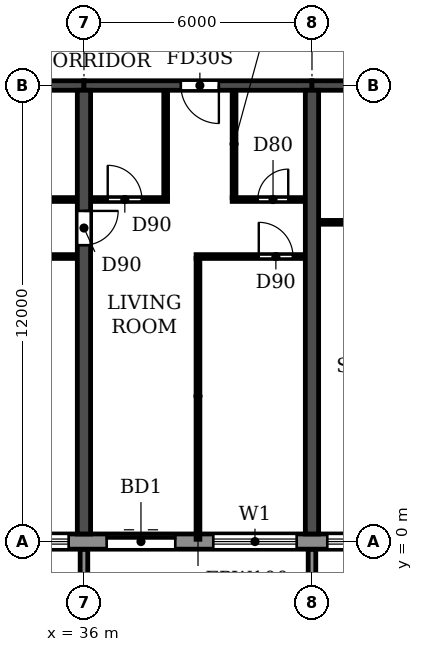
"""IFC4 building model, lengths in metres.
Left out: names, types, materials, properties, quantities, classifications, styles, units other than length and angle.
Written with IfcOpenShell. Run it as: python <this file> out.ifc"""

import sys

from ifc_helpers import new_model, si_unit, direction, frame, frame_2d, origin, place, context, subcontext, project, spatial, polyline, rectangle, outline, extrude, source, transform, mapped, element, fill, save


model = new_model("IFC4")
c1 = context("Model", 3, precision=1e-05, world=origin(), true_north=direction((0.0, 1.0)))
c2 = subcontext(c1, "Body", "Model", "MODEL_VIEW")
j1 = project(units=[si_unit("LENGTHUNIT", "METRE"), si_unit("PLANEANGLEUNIT", "RADIAN")], contexts=[c1])
p1 = place(None, origin())
s1 = spatial("IfcSite", under=j1, at=p1, CompositionType="ELEMENT")
p2 = place(p1, origin())
s2 = spatial("IfcBuilding", under=s1, at=p2, CompositionType="ELEMENT")
p3 = place(p2, frame((0.0, 0.0, 82.8)))
s3 = spatial("IfcBuildingStorey", under=s2, at=p3, CompositionType="ELEMENT", Elevation=82.8)
p4 = place(p3, frame((36.0, 0.2, 0.0), z_axis=(0.0, 0.0, 1.0), x_axis=(0.0, 1.0, 0.0)))
e1 = element("IfcWall", 1, at=p4, inside=s3, PredefinedType="SHEAR", context=c2, shape_type="SweptSolid", body=[
    extrude(rectangle(XDim=11.675, YDim=0.35, at=frame_2d((5.837, 0.0))), origin(), (0.0, 0.0, 1.0), 3.06),
])
p5 = place(p4, frame((7.6, 0.0, 0.0)))
e2 = element("IfcOpeningElement", 2, at=p5, cuts=e1, PredefinedType="OPENING", context=c2, shape_type="SweptSolid", body=[
    extrude(rectangle(XDim=0.9, YDim=2.1, at=frame_2d((0.45, 1.05))), frame((0.0, 0.185, 0.0), z_axis=(0.0, -1.0, 0.0), x_axis=(1.0, 0.0, 0.0)), (0.0, 0.0, 1.0), 0.37),
])
p6 = place(p3, frame((42.0, 0.2, 0.0), z_axis=(0.0, 0.0, 1.0), x_axis=(0.0, 1.0, 0.0)))
e3 = element("IfcWall", 3, at=p6, inside=s3, PredefinedType="SHEAR", context=c2, shape_type="SweptSolid", body=[
    extrude(rectangle(XDim=11.675, YDim=0.35, at=frame_2d((5.837, 0.0))), origin(), (0.0, 0.0, 1.0), 3.06),
])
p7 = place(p3, frame((30.0, 12.0, 0.0), z_axis=(0.0, 0.0, 1.0), x_axis=(1.0, 0.0, 0.0)))
e4 = element("IfcWall", 4, at=p7, inside=s3, PredefinedType="SHEAR", context=c2, shape_type="SweptSolid", body=[
    extrude(rectangle(XDim=6.0, YDim=0.25, at=frame_2d((3.0, 0.0))), origin(), (0.0, 0.0, 1.0), 2.46),
])
p8 = place(p3, frame((36.0, 12.0, 0.0), z_axis=(0.0, 0.0, 1.0), x_axis=(1.0, 0.0, 0.0)))
e5 = element("IfcWall", 5, at=p8, inside=s3, PredefinedType="SHEAR", context=c2, shape_type="SweptSolid", body=[
    extrude(rectangle(XDim=6.0, YDim=0.25, at=frame_2d((3.0, 0.0))), origin(), (0.0, 0.0, 1.0), 2.46),
])
p9 = place(p8, frame((2.55, 0.0, 0.0)))
e6 = element("IfcOpeningElement", 6, at=p9, cuts=e5, PredefinedType="OPENING", context=c2, shape_type="SweptSolid", body=[
    extrude(rectangle(XDim=1.0, YDim=2.1, at=frame_2d((0.5, 1.05))), frame((0.0, 0.135, 0.0), z_axis=(0.0, -1.0, 0.0), x_axis=(1.0, 0.0, 0.0)), (0.0, 0.0, 1.0), 0.27),
])
p10 = place(p3, frame((42.0, 12.0, 0.0), z_axis=(0.0, 0.0, 1.0), x_axis=(1.0, 0.0, 0.0)))
e7 = element("IfcWall", 7, at=p10, inside=s3, PredefinedType="SHEAR", context=c2, shape_type="SweptSolid", body=[
    extrude(rectangle(XDim=6.0, YDim=0.25, at=frame_2d((3.0, 0.0))), origin(), (0.0, 0.0, 1.0), 2.46),
])
p11 = place(p10, frame((2.45, 0.0, 0.0)))
e8 = element("IfcOpeningElement", 8, at=p11, cuts=e7, PredefinedType="OPENING", context=c2, shape_type="SweptSolid", body=[
    extrude(rectangle(XDim=1.0, YDim=2.1, at=frame_2d((0.5, 1.05))), frame((0.0, 0.135, 0.0), z_axis=(0.0, -1.0, 0.0), x_axis=(1.0, 0.0, 0.0)), (0.0, 0.0, 1.0), 0.27),
])
p12 = place(p3, frame((10.683, 0.0, 0.0), z_axis=(0.0, 0.0, 1.0), x_axis=(1.0, 0.0, 0.0)))
e9 = element("IfcWall", 9, at=p12, inside=s3, PredefinedType="STANDARD", context=c2, shape_type="SweptSolid", body=[
    extrude(rectangle(XDim=80.634, YDim=0.4, at=frame_2d((40.317, 0.0))), origin(), (0.0, 0.0, 1.0), 3.06),
])
p13 = place(p12, frame((1.717, 0.0, 0.9)))
e10 = element("IfcOpeningElement", 10, at=p13, cuts=e9, PredefinedType="OPENING", context=c2, shape_type="SweptSolid", body=[
    extrude(rectangle(XDim=2.2, YDim=1.5, at=frame_2d((1.1, 0.75))), frame((0.0, 0.21, 0.0), z_axis=(0.0, -1.0, 0.0), x_axis=(1.0, 0.0, 0.0)), (0.0, 0.0, 1.0), 0.42),
])
p14 = place(p12, frame((4.917, 0.0, 0.0)))
e11 = element("IfcOpeningElement", 11, at=p14, cuts=e9, PredefinedType="OPENING", context=c2, shape_type="SweptSolid", body=[
    extrude(rectangle(XDim=1.8, YDim=2.4, at=frame_2d((0.9, 1.2))), frame((0.0, 0.21, 0.0), z_axis=(0.0, -1.0, 0.0), x_axis=(1.0, 0.0, 0.0)), (0.0, 0.0, 1.0), 0.42),
])
p15 = place(p12, frame((7.717, 0.0, 0.9)))
e12 = element("IfcOpeningElement", 12, at=p15, cuts=e9, PredefinedType="OPENING", context=c2, shape_type="SweptSolid", body=[
    extrude(rectangle(XDim=2.2, YDim=1.5, at=frame_2d((1.1, 0.75))), frame((0.0, 0.21, 0.0), z_axis=(0.0, -1.0, 0.0), x_axis=(1.0, 0.0, 0.0)), (0.0, 0.0, 1.0), 0.42),
])
p16 = place(p12, frame((10.717, 0.0, 0.9)))
e13 = element("IfcOpeningElement", 13, at=p16, cuts=e9, PredefinedType="OPENING", context=c2, shape_type="SweptSolid", body=[
    extrude(rectangle(XDim=2.2, YDim=1.5, at=frame_2d((1.1, 0.75))), frame((0.0, 0.21, 0.0), z_axis=(0.0, -1.0, 0.0), x_axis=(1.0, 0.0, 0.0)), (0.0, 0.0, 1.0), 0.42),
])
p17 = place(p12, frame((13.917, 0.0, 0.0)))
e14 = element("IfcOpeningElement", 14, at=p17, cuts=e9, PredefinedType="OPENING", context=c2, shape_type="SweptSolid", body=[
    extrude(rectangle(XDim=1.8, YDim=2.4, at=frame_2d((0.9, 1.2))), frame((0.0, 0.21, 0.0), z_axis=(0.0, -1.0, 0.0), x_axis=(1.0, 0.0, 0.0)), (0.0, 0.0, 1.0), 0.42),
])
p18 = place(p12, frame((16.717, 0.0, 0.9)))
e15 = element("IfcOpeningElement", 15, at=p18, cuts=e9, PredefinedType="OPENING", context=c2, shape_type="SweptSolid", body=[
    extrude(rectangle(XDim=2.2, YDim=1.5, at=frame_2d((1.1, 0.75))), frame((0.0, 0.21, 0.0), z_axis=(0.0, -1.0, 0.0), x_axis=(1.0, 0.0, 0.0)), (0.0, 0.0, 1.0), 0.42),
])
p19 = place(p12, frame((19.717, 0.0, 0.9)))
e16 = element("IfcOpeningElement", 16, at=p19, cuts=e9, PredefinedType="OPENING", context=c2, shape_type="SweptSolid", body=[
    extrude(rectangle(XDim=2.2, YDim=1.5, at=frame_2d((1.1, 0.75))), frame((0.0, 0.21, 0.0), z_axis=(0.0, -1.0, 0.0), x_axis=(1.0, 0.0, 0.0)), (0.0, 0.0, 1.0), 0.42),
])
p20 = place(p12, frame((22.717, 0.0, 0.9)))
e17 = element("IfcOpeningElement", 17, at=p20, cuts=e9, PredefinedType="OPENING", context=c2, shape_type="SweptSolid", body=[
    extrude(rectangle(XDim=2.2, YDim=1.5, at=frame_2d((1.1, 0.75))), frame((0.0, 0.21, 0.0), z_axis=(0.0, -1.0, 0.0), x_axis=(1.0, 0.0, 0.0)), (0.0, 0.0, 1.0), 0.42),
])
p21 = place(p12, frame((25.917, 0.0, 0.0)))
e18 = element("IfcOpeningElement", 18, at=p21, cuts=e9, PredefinedType="OPENING", context=c2, shape_type="SweptSolid", body=[
    extrude(rectangle(XDim=1.8, YDim=2.4, at=frame_2d((0.9, 1.2))), frame((0.0, 0.21, 0.0), z_axis=(0.0, -1.0, 0.0), x_axis=(1.0, 0.0, 0.0)), (0.0, 0.0, 1.0), 0.42),
])
p22 = place(p12, frame((28.717, 0.0, 0.9)))
e19 = element("IfcOpeningElement", 19, at=p22, cuts=e9, PredefinedType="OPENING", context=c2, shape_type="SweptSolid", body=[
    extrude(rectangle(XDim=2.2, YDim=1.5, at=frame_2d((1.1, 0.75))), frame((0.0, 0.21, 0.0), z_axis=(0.0, -1.0, 0.0), x_axis=(1.0, 0.0, 0.0)), (0.0, 0.0, 1.0), 0.42),
])
p23 = place(p12, frame((31.717, 0.0, 0.9)))
e20 = element("IfcOpeningElement", 20, at=p23, cuts=e9, PredefinedType="OPENING", context=c2, shape_type="SweptSolid", body=[
    extrude(rectangle(XDim=2.2, YDim=1.5, at=frame_2d((1.1, 0.75))), frame((0.0, 0.21, 0.0), z_axis=(0.0, -1.0, 0.0), x_axis=(1.0, 0.0, 0.0)), (0.0, 0.0, 1.0), 0.42),
])
p24 = place(p12, frame((34.717, 0.0, 0.9)))
e21 = element("IfcOpeningElement", 21, at=p24, cuts=e9, PredefinedType="OPENING", context=c2, shape_type="SweptSolid", body=[
    extrude(rectangle(XDim=2.2, YDim=1.5, at=frame_2d((1.1, 0.75))), frame((0.0, 0.21, 0.0), z_axis=(0.0, -1.0, 0.0), x_axis=(1.0, 0.0, 0.0)), (0.0, 0.0, 1.0), 0.42),
])
p25 = place(p12, frame((37.717, 0.0, 0.9)))
e22 = element("IfcOpeningElement", 22, at=p25, cuts=e9, PredefinedType="OPENING", context=c2, shape_type="SweptSolid", body=[
    extrude(rectangle(XDim=2.2, YDim=1.5, at=frame_2d((1.1, 0.75))), frame((0.0, 0.21, 0.0), z_axis=(0.0, -1.0, 0.0), x_axis=(1.0, 0.0, 0.0)), (0.0, 0.0, 1.0), 0.42),
])
p26 = place(p12, frame((40.917, 0.0, 0.0)))
e23 = element("IfcOpeningElement", 23, at=p26, cuts=e9, PredefinedType="OPENING", context=c2, shape_type="SweptSolid", body=[
    extrude(rectangle(XDim=1.8, YDim=2.4, at=frame_2d((0.9, 1.2))), frame((0.0, 0.21, 0.0), z_axis=(0.0, -1.0, 0.0), x_axis=(1.0, 0.0, 0.0)), (0.0, 0.0, 1.0), 0.42),
])
p27 = place(p12, frame((43.717, 0.0, 0.9)))
e24 = element("IfcOpeningElement", 24, at=p27, cuts=e9, PredefinedType="OPENING", context=c2, shape_type="SweptSolid", body=[
    extrude(rectangle(XDim=2.2, YDim=1.5, at=frame_2d((1.1, 0.75))), frame((0.0, 0.21, 0.0), z_axis=(0.0, -1.0, 0.0), x_axis=(1.0, 0.0, 0.0)), (0.0, 0.0, 1.0), 0.42),
])
p28 = place(p12, frame((46.717, 0.0, 0.9)))
e25 = element("IfcOpeningElement", 25, at=p28, cuts=e9, PredefinedType="OPENING", context=c2, shape_type="SweptSolid", body=[
    extrude(rectangle(XDim=2.2, YDim=1.5, at=frame_2d((1.1, 0.75))), frame((0.0, 0.21, 0.0), z_axis=(0.0, -1.0, 0.0), x_axis=(1.0, 0.0, 0.0)), (0.0, 0.0, 1.0), 0.42),
])
p29 = place(p12, frame((49.717, 0.0, 0.9)))
e26 = element("IfcOpeningElement", 26, at=p29, cuts=e9, PredefinedType="OPENING", context=c2, shape_type="SweptSolid", body=[
    extrude(rectangle(XDim=2.2, YDim=1.5, at=frame_2d((1.1, 0.75))), frame((0.0, 0.21, 0.0), z_axis=(0.0, -1.0, 0.0), x_axis=(1.0, 0.0, 0.0)), (0.0, 0.0, 1.0), 0.42),
])
p30 = place(p12, frame((52.917, 0.0, 0.0)))
e27 = element("IfcOpeningElement", 27, at=p30, cuts=e9, PredefinedType="OPENING", context=c2, shape_type="SweptSolid", body=[
    extrude(rectangle(XDim=1.8, YDim=2.4, at=frame_2d((0.9, 1.2))), frame((0.0, 0.21, 0.0), z_axis=(0.0, -1.0, 0.0), x_axis=(1.0, 0.0, 0.0)), (0.0, 0.0, 1.0), 0.42),
])
p31 = place(p12, frame((55.717, 0.0, 0.9)))
e28 = element("IfcOpeningElement", 28, at=p31, cuts=e9, PredefinedType="OPENING", context=c2, shape_type="SweptSolid", body=[
    extrude(rectangle(XDim=2.2, YDim=1.5, at=frame_2d((1.1, 0.75))), frame((0.0, 0.21, 0.0), z_axis=(0.0, -1.0, 0.0), x_axis=(1.0, 0.0, 0.0)), (0.0, 0.0, 1.0), 0.42),
])
p32 = place(p12, frame((58.717, 0.0, 0.9)))
e29 = element("IfcOpeningElement", 29, at=p32, cuts=e9, PredefinedType="OPENING", context=c2, shape_type="SweptSolid", body=[
    extrude(rectangle(XDim=2.2, YDim=1.5, at=frame_2d((1.1, 0.75))), frame((0.0, 0.21, 0.0), z_axis=(0.0, -1.0, 0.0), x_axis=(1.0, 0.0, 0.0)), (0.0, 0.0, 1.0), 0.42),
])
p33 = place(p12, frame((61.717, 0.0, 0.9)))
e30 = element("IfcOpeningElement", 30, at=p33, cuts=e9, PredefinedType="OPENING", context=c2, shape_type="SweptSolid", body=[
    extrude(rectangle(XDim=2.2, YDim=1.5, at=frame_2d((1.1, 0.75))), frame((0.0, 0.21, 0.0), z_axis=(0.0, -1.0, 0.0), x_axis=(1.0, 0.0, 0.0)), (0.0, 0.0, 1.0), 0.42),
])
p34 = place(p12, frame((64.917, 0.0, 0.0)))
e31 = element("IfcOpeningElement", 31, at=p34, cuts=e9, PredefinedType="OPENING", context=c2, shape_type="SweptSolid", body=[
    extrude(rectangle(XDim=1.8, YDim=2.4, at=frame_2d((0.9, 1.2))), frame((0.0, 0.21, 0.0), z_axis=(0.0, -1.0, 0.0), x_axis=(1.0, 0.0, 0.0)), (0.0, 0.0, 1.0), 0.42),
])
p35 = place(p12, frame((67.717, 0.0, 0.9)))
e32 = element("IfcOpeningElement", 32, at=p35, cuts=e9, PredefinedType="OPENING", context=c2, shape_type="SweptSolid", body=[
    extrude(rectangle(XDim=2.2, YDim=1.5, at=frame_2d((1.1, 0.75))), frame((0.0, 0.21, 0.0), z_axis=(0.0, -1.0, 0.0), x_axis=(1.0, 0.0, 0.0)), (0.0, 0.0, 1.0), 0.42),
])
p36 = place(p12, frame((70.717, 0.0, 0.9)))
e33 = element("IfcOpeningElement", 33, at=p36, cuts=e9, PredefinedType="OPENING", context=c2, shape_type="SweptSolid", body=[
    extrude(rectangle(XDim=2.2, YDim=1.5, at=frame_2d((1.1, 0.75))), frame((0.0, 0.21, 0.0), z_axis=(0.0, -1.0, 0.0), x_axis=(1.0, 0.0, 0.0)), (0.0, 0.0, 1.0), 0.42),
])
p37 = place(p12, frame((73.917, 0.0, 0.0)))
e34 = element("IfcOpeningElement", 34, at=p37, cuts=e9, PredefinedType="OPENING", context=c2, shape_type="SweptSolid", body=[
    extrude(rectangle(XDim=1.8, YDim=2.4, at=frame_2d((0.9, 1.2))), frame((0.0, 0.21, 0.0), z_axis=(0.0, -1.0, 0.0), x_axis=(1.0, 0.0, 0.0)), (0.0, 0.0, 1.0), 0.42),
])
p38 = place(p12, frame((76.717, 0.0, 0.9)))
e35 = element("IfcOpeningElement", 35, at=p38, cuts=e9, PredefinedType="OPENING", context=c2, shape_type="SweptSolid", body=[
    extrude(rectangle(XDim=2.2, YDim=1.5, at=frame_2d((1.1, 0.75))), frame((0.0, 0.21, 0.0), z_axis=(0.0, -1.0, 0.0), x_axis=(1.0, 0.0, 0.0)), (0.0, 0.0, 1.0), 0.42),
])
m1 = source(origin(), c2, "Body", "SweptSolid", [
    extrude(outline(polyline([(0.0, 0.0), (0.2, 0.0), (0.2, 1.65), (0.0, 1.65), (0.0, 0.0)])), origin(), (0.0, 0.0, 1.0), 3.1),
])
for number, where in (
    (36, (35.9, -1.85, 0.0)),
    (37, (41.9, -1.85, 0.0)),
):
    element("IfcWall", number, at=place(p3, frame(where)), inside=s3, PredefinedType="STANDARD", context=c2, shape_type="MappedRepresentation", body=[
        mapped(m1, transform((0.0, 0.0, 0.0))),
    ])
p39 = place(p3, frame((33.1, 7.5, 0.0), z_axis=(0.0, 0.0, 1.0), x_axis=(1.0, 0.0, 0.0)))
e38 = element("IfcWall", 38, at=p39, inside=s3, PredefinedType="PARTITIONING", context=c2, shape_type="SweptSolid", body=[
    extrude(rectangle(XDim=2.715, YDim=0.1, at=frame_2d((1.357, 0.0))), origin(), (0.0, 0.0, 1.0), 3.06),
])
p40 = place(p39, frame((0.4, 0.0, 0.0)))
e39 = element("IfcOpeningElement", 39, at=p40, cuts=e38, PredefinedType="OPENING", context=c2, shape_type="SweptSolid", body=[
    extrude(rectangle(XDim=0.9, YDim=2.1, at=frame_2d((0.45, 1.05))), frame((0.0, 0.06, 0.0), z_axis=(0.0, -1.0, 0.0), x_axis=(1.0, 0.0, 0.0)), (0.0, 0.0, 1.0), 0.12),
])
p41 = place(p3, frame((38.95, 7.5, 0.0), z_axis=(0.0, 0.0, 1.0), x_axis=(1.0, 0.0, 0.0)))
e40 = element("IfcWall", 40, at=p41, inside=s3, PredefinedType="PARTITIONING", context=c2, shape_type="SweptSolid", body=[
    extrude(rectangle(XDim=2.865, YDim=0.1, at=frame_2d((1.433, 0.0))), origin(), (0.0, 0.0, 1.0), 3.06),
])
p42 = place(p41, frame((1.65, 0.0, 0.0)))
e41 = element("IfcOpeningElement", 41, at=p42, cuts=e40, PredefinedType="OPENING", context=c2, shape_type="SweptSolid", body=[
    extrude(rectangle(XDim=0.9, YDim=2.1, at=frame_2d((0.45, 1.05))), frame((0.0, 0.06, 0.0), z_axis=(0.0, -1.0, 0.0), x_axis=(1.0, 0.0, 0.0)), (0.0, 0.0, 1.0), 0.12),
])
p43 = place(p3, frame((42.185, 8.4, 0.0), z_axis=(0.0, 0.0, 1.0), x_axis=(1.0, 0.0, 0.0)))
e42 = element("IfcWall", 42, at=p43, inside=s3, PredefinedType="PARTITIONING", context=c2, shape_type="SweptSolid", body=[
    extrude(rectangle(XDim=1.915, YDim=0.1, at=frame_2d((0.958, 0.0))), origin(), (0.0, 0.0, 1.0), 3.06),
])
p44 = place(p3, frame((33.1, 9.0, 0.0), z_axis=(0.0, 0.0, 1.0), x_axis=(1.0, 0.0, 0.0)))
e43 = element("IfcWall", 43, at=p44, inside=s3, PredefinedType="PARTITIONING", context=c2, shape_type="SweptSolid", body=[
    extrude(rectangle(XDim=2.715, YDim=0.1, at=frame_2d((1.357, 0.0))), origin(), (0.0, 0.0, 1.0), 3.06),
])
p45 = place(p44, frame((1.0, 0.0, 0.0)))
e44 = element("IfcOpeningElement", 44, at=p45, cuts=e43, PredefinedType="OPENING", context=c2, shape_type="SweptSolid", body=[
    extrude(rectangle(XDim=0.8, YDim=2.1, at=frame_2d((0.4, 1.05))), frame((0.0, 0.06, 0.0), z_axis=(0.0, -1.0, 0.0), x_axis=(1.0, 0.0, 0.0)), (0.0, 0.0, 1.0), 0.12),
])
p46 = place(p3, frame((36.185, 9.0, 0.0), z_axis=(0.0, 0.0, 1.0), x_axis=(1.0, 0.0, 0.0)))
e45 = element("IfcWall", 45, at=p46, inside=s3, PredefinedType="PARTITIONING", context=c2, shape_type="SweptSolid", body=[
    extrude(rectangle(XDim=2.015, YDim=0.1, at=frame_2d((1.007, 0.0))), origin(), (0.0, 0.0, 1.0), 3.06),
])
p47 = place(p46, frame((0.44, 0.0, 0.0)))
e46 = element("IfcOpeningElement", 46, at=p47, cuts=e45, PredefinedType="OPENING", context=c2, shape_type="SweptSolid", body=[
    extrude(rectangle(XDim=0.9, YDim=2.1, at=frame_2d((0.45, 1.05))), frame((0.0, 0.06, 0.0), z_axis=(0.0, -1.0, 0.0), x_axis=(1.0, 0.0, 0.0)), (0.0, 0.0, 1.0), 0.12),
])
p48 = place(p3, frame((39.9, 9.0, 0.0), z_axis=(0.0, 0.0, 1.0), x_axis=(1.0, 0.0, 0.0)))
e47 = element("IfcWall", 47, at=p48, inside=s3, PredefinedType="PARTITIONING", context=c2, shape_type="SweptSolid", body=[
    extrude(rectangle(XDim=1.915, YDim=0.1, at=frame_2d((0.958, 0.0))), origin(), (0.0, 0.0, 1.0), 3.06),
])
p49 = place(p48, frame((0.675, 0.0, 0.0)))
e48 = element("IfcOpeningElement", 48, at=p49, cuts=e47, PredefinedType="OPENING", context=c2, shape_type="SweptSolid", body=[
    extrude(rectangle(XDim=0.8, YDim=2.1, at=frame_2d((0.4, 1.05))), frame((0.0, 0.06, 0.0), z_axis=(0.0, -1.0, 0.0), x_axis=(1.0, 0.0, 0.0)), (0.0, 0.0, 1.0), 0.12),
])
p50 = place(p3, frame((38.15, 9.05, 0.0), z_axis=(0.0, 0.0, 1.0), x_axis=(0.0, 1.0, 0.0)))
e49 = element("IfcWall", 49, at=p50, inside=s3, PredefinedType="PARTITIONING", context=c2, shape_type="SweptSolid", body=[
    extrude(rectangle(XDim=2.815, YDim=0.1, at=frame_2d((1.407, 0.0))), origin(), (0.0, 0.0, 1.0), 3.06),
])
p51 = place(p3, frame((39.0, 0.06, 0.0), z_axis=(0.0, 0.0, 1.0), x_axis=(0.0, 1.0, 0.0)))
e50 = element("IfcWall", 50, at=p51, inside=s3, PredefinedType="PARTITIONING", context=c2, shape_type="SweptSolid", body=[
    extrude(rectangle(XDim=7.39, YDim=0.1, at=frame_2d((3.695, 0.0))), origin(), (0.0, 0.0, 1.0), 3.06),
])
p52 = place(p3, frame((39.95, 9.05, 0.0), z_axis=(0.0, 0.0, 1.0), x_axis=(0.0, 1.0, 0.0)))
e51 = element("IfcWall", 51, at=p52, inside=s3, PredefinedType="PARTITIONING", context=c2, shape_type="SweptSolid", body=[
    extrude(rectangle(XDim=2.815, YDim=0.1, at=frame_2d((1.407, 0.0))), origin(), (0.0, 0.0, 1.0), 3.06),
])
p53 = place(p20, origin())
e52 = element("IfcWindow", 52, at=p53, inside=s3, PartitioningType="DOUBLE_PANEL_HORIZONTAL", PredefinedType="WINDOW", context=c2, shape_type="SweptSolid", body=[
    extrude(rectangle(XDim=2.2, YDim=1.5, at=frame_2d((1.1, 0.75))), frame((0.0, 0.03, 0.0), z_axis=(0.0, -1.0, 0.0), x_axis=(1.0, 0.0, 0.0)), (0.0, 0.0, 1.0), 0.06),
])
fill(e17, e52)
p54 = place(p21, origin())
e53 = element("IfcDoor", 53, at=p54, inside=s3, OperationType="DOUBLE_DOOR_SLIDING", PredefinedType="DOOR", context=c2, shape_type="SweptSolid", body=[
    extrude(rectangle(XDim=1.8, YDim=2.4, at=frame_2d((0.9, 1.2))), frame((0.0, 0.025, 0.0), z_axis=(0.0, -1.0, 0.0), x_axis=(1.0, 0.0, 0.0)), (0.0, 0.0, 1.0), 0.05),
])
fill(e18, e53)
p55 = place(p22, origin())
e54 = element("IfcWindow", 54, at=p55, inside=s3, PartitioningType="DOUBLE_PANEL_HORIZONTAL", PredefinedType="WINDOW", context=c2, shape_type="SweptSolid", body=[
    extrude(rectangle(XDim=2.2, YDim=1.5, at=frame_2d((1.1, 0.75))), frame((0.0, 0.03, 0.0), z_axis=(0.0, -1.0, 0.0), x_axis=(1.0, 0.0, 0.0)), (0.0, 0.0, 1.0), 0.06),
])
fill(e19, e54)
p56 = place(p23, origin())
e55 = element("IfcWindow", 55, at=p56, inside=s3, PartitioningType="DOUBLE_PANEL_HORIZONTAL", PredefinedType="WINDOW", context=c2, shape_type="SweptSolid", body=[
    extrude(rectangle(XDim=2.2, YDim=1.5, at=frame_2d((1.1, 0.75))), frame((0.0, 0.03, 0.0), z_axis=(0.0, -1.0, 0.0), x_axis=(1.0, 0.0, 0.0)), (0.0, 0.0, 1.0), 0.06),
])
fill(e20, e55)
p57 = place(p5, frame((0.9, 0.0, 0.0), z_axis=(0.0, 0.0, 1.0), x_axis=(-1.0, 0.0, 0.0)))
e56 = element("IfcDoor", 56, at=p57, inside=s3, OperationType="SINGLE_SWING_LEFT", PredefinedType="DOOR", context=c2, shape_type="SweptSolid", body=[
    extrude(rectangle(XDim=0.9, YDim=2.1, at=frame_2d((0.45, 1.05))), frame((0.0, 0.025, 0.0), z_axis=(0.0, -1.0, 0.0), x_axis=(1.0, 0.0, 0.0)), (0.0, 0.0, 1.0), 0.05),
])
fill(e2, e56)
p58 = place(p47, origin())
e57 = element("IfcDoor", 57, at=p58, inside=s3, OperationType="SINGLE_SWING_LEFT", PredefinedType="DOOR", context=c2, shape_type="SweptSolid", body=[
    extrude(rectangle(XDim=0.9, YDim=2.1, at=frame_2d((0.45, 1.05))), frame((0.0, 0.025, 0.0), z_axis=(0.0, -1.0, 0.0), x_axis=(1.0, 0.0, 0.0)), (0.0, 0.0, 1.0), 0.05),
])
fill(e46, e57)
p59 = place(p9, frame((1.0, 0.0, 0.0), z_axis=(0.0, 0.0, 1.0), x_axis=(-1.0, 0.0, 0.0)))
e58 = element("IfcDoor", 58, at=p59, inside=s3, OperationType="SINGLE_SWING_LEFT", PredefinedType="DOOR", context=c2, shape_type="SweptSolid", body=[
    extrude(rectangle(XDim=1.0, YDim=2.1, at=frame_2d((0.5, 1.05))), frame((0.0, 0.025, 0.0), z_axis=(0.0, -1.0, 0.0), x_axis=(1.0, 0.0, 0.0)), (0.0, 0.0, 1.0), 0.05),
])
fill(e6, e58)
p60 = place(p49, origin())
e59 = element("IfcDoor", 59, at=p60, inside=s3, OperationType="SINGLE_SWING_RIGHT", PredefinedType="DOOR", context=c2, shape_type="SweptSolid", body=[
    extrude(rectangle(XDim=0.8, YDim=2.1, at=frame_2d((0.4, 1.05))), frame((0.0, 0.025, 0.0), z_axis=(0.0, -1.0, 0.0), x_axis=(1.0, 0.0, 0.0)), (0.0, 0.0, 1.0), 0.05),
])
fill(e48, e59)
p61 = place(p42, origin())
e60 = element("IfcDoor", 60, at=p61, inside=s3, OperationType="SINGLE_SWING_LEFT", PredefinedType="DOOR", context=c2, shape_type="SweptSolid", body=[
    extrude(rectangle(XDim=0.9, YDim=2.1, at=frame_2d((0.45, 1.05))), frame((0.0, 0.025, 0.0), z_axis=(0.0, -1.0, 0.0), x_axis=(1.0, 0.0, 0.0)), (0.0, 0.0, 1.0), 0.05),
])
fill(e41, e60)
save(model, sys.argv[1])
